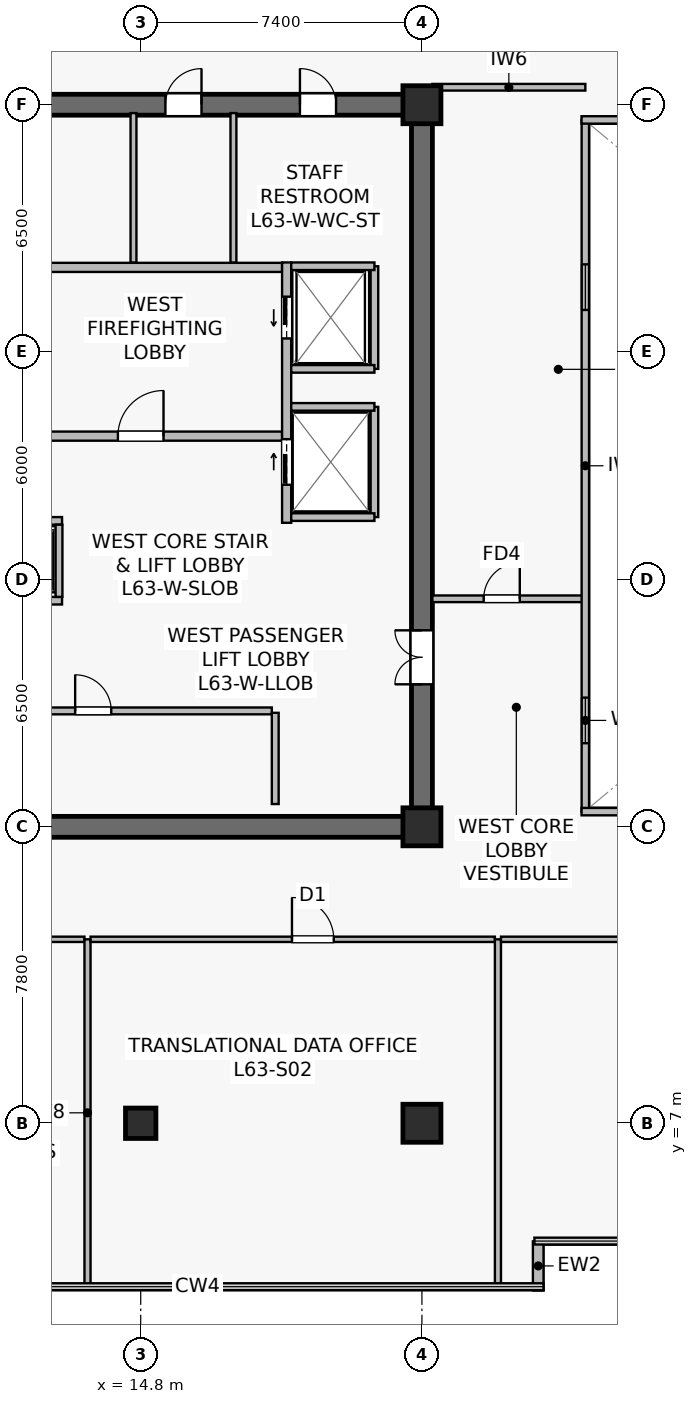
"""IFC4 building model, lengths in metres.
Left out: names, types, materials, properties, quantities, classifications, styles, units other than length and angle.
Written with IfcOpenShell. Run it as: python <this file> out.ifc"""

import sys

from ifc_helpers import new_model, si_unit, direction, frame, frame_2d, origin, origin_2d, place, context, subcontext, project, spatial, rectangle, extrude, source, transform, mapped, element, fill, save


model = new_model("IFC4")
c1 = context("Model", 3, precision=1e-05, world=origin(), true_north=direction((0.0, 1.0)))
c2 = subcontext(c1, "Body", "Model", "MODEL_VIEW")
j1 = project(units=[si_unit("LENGTHUNIT", "METRE"), si_unit("PLANEANGLEUNIT", "RADIAN")], contexts=[c1])
p1 = place(None, origin())
s1 = spatial("IfcSite", under=j1, at=p1, CompositionType="ELEMENT")
p2 = place(p1, origin())
s2 = spatial("IfcBuilding", under=s1, at=p2, CompositionType="ELEMENT")
p3 = place(p2, frame((0.0, 0.0, 262.9)))
s3 = spatial("IfcBuildingStorey", under=s2, at=p3, CompositionType="ELEMENT", Elevation=262.9)
p4 = place(p3, frame((7.125, 14.8, 0.0), z_axis=(0.0, 0.0, 1.0), x_axis=(1.0, 0.0, 0.0)))
e1 = element("IfcWall", 1, at=p4, inside=s3, PredefinedType="SHEAR", context=c2, shape_type="SweptSolid", body=[
    extrude(rectangle(XDim=15.35, YDim=0.55, at=frame_2d((7.675, 0.0))), origin(), (0.0, 0.0, 1.0), 3.8),
])
p5 = place(p3, frame((7.125, 33.8, 0.0), z_axis=(0.0, 0.0, 1.0), x_axis=(1.0, 0.0, 0.0)))
e2 = element("IfcWall", 2, at=p5, inside=s3, PredefinedType="SHEAR", context=c2, shape_type="SweptSolid", body=[
    extrude(rectangle(XDim=15.35, YDim=0.55, at=frame_2d((7.675, 0.0))), origin(), (0.0, 0.0, 1.0), 3.8),
])
p6 = place(p5, frame((8.325, 0.0, 0.0)))
e3 = element("IfcOpeningElement", 3, at=p6, cuts=e2, PredefinedType="OPENING", context=c2, shape_type="SweptSolid", body=[
    extrude(rectangle(XDim=0.95, YDim=2.15, at=frame_2d((0.475, 1.075))), frame((0.0, 0.285, 0.0), z_axis=(0.0, -1.0, 0.0), x_axis=(1.0, 0.0, 0.0)), (0.0, 0.0, 1.0), 0.57),
])
p7 = place(p5, frame((11.865, 0.0, 0.0)))
e4 = element("IfcOpeningElement", 4, at=p7, cuts=e2, PredefinedType="OPENING", context=c2, shape_type="SweptSolid", body=[
    extrude(rectangle(XDim=0.95, YDim=2.15, at=frame_2d((0.475, 1.075))), frame((0.0, 0.285, 0.0), z_axis=(0.0, -1.0, 0.0), x_axis=(1.0, 0.0, 0.0)), (0.0, 0.0, 1.0), 0.57),
])
p8 = place(p3, frame((22.2, 15.075, 0.0), z_axis=(0.0, 0.0, 1.0), x_axis=(0.0, 1.0, 0.0)))
e5 = element("IfcWall", 5, at=p8, inside=s3, PredefinedType="SHEAR", context=c2, shape_type="SweptSolid", body=[
    extrude(rectangle(XDim=18.45, YDim=0.55, at=frame_2d((9.225, 0.0))), origin(), (0.0, 0.0, 1.0), 3.8),
])
p9 = place(p8, frame((3.475, 0.0, 0.0)))
e6 = element("IfcOpeningElement", 6, at=p9, cuts=e5, PredefinedType="OPENING", context=c2, shape_type="SweptSolid", body=[
    extrude(rectangle(XDim=1.42, YDim=2.2, at=frame_2d((0.71, 1.1))), frame((0.0, 0.285, 0.0), z_axis=(0.0, -1.0, 0.0), x_axis=(1.0, 0.0, 0.0)), (0.0, 0.0, 1.0), 0.57),
])
m1 = source(origin(), c2, "Body", "SweptSolid", [
    extrude(rectangle(XDim=0.8, YDim=0.8, at=origin_2d()), origin(), (0.0, 0.0, 1.0), 4.1),
])
p10 = place(p3, frame((14.8, 7.0, 0.0), z_axis=(0.0, 0.0, 1.0), x_axis=(1.0, 0.0, 0.0)))
e7 = element("IfcColumn", 7, at=p10, inside=s3, PredefinedType="COLUMN", context=c2, shape_type="MappedRepresentation", body=[
    mapped(m1, transform((0.0, 0.0, 0.0), scale=1.0)),
])
m2 = source(origin(), c2, "Body", "SweptSolid", [
    extrude(rectangle(XDim=1.0, YDim=1.0, at=origin_2d()), origin(), (0.0, 0.0, 1.0), 4.1),
])
for number, where, z_axis, x_axis in (
    (8, (22.2, 7.0, 0.0), (0.0, 0.0, 1.0), (1.0, 0.0, 0.0)),
    (9, (22.2, 14.8, 0.0), (0.0, 0.0, 1.0), (1.0, 0.0, 0.0)),
    (10, (22.2, 33.8, 0.0), (0.0, 0.0, 1.0), (1.0, 0.0, 0.0)),
):
    element("IfcColumn", number, at=place(p3, frame(where, z_axis=z_axis, x_axis=x_axis)), inside=s3, PredefinedType="COLUMN", context=c2, shape_type="MappedRepresentation", body=[
        mapped(m2, transform((0.0, 0.0, 0.0), scale=1.0)),
    ])
p11 = place(p3, frame((25.26, 2.6, 0.0), z_axis=(0.0, 0.0, 1.0), x_axis=(0.0, 1.0, 0.0)))
e11 = element("IfcWall", 11, at=p11, inside=s3, PredefinedType="STANDARD", context=c2, shape_type="SweptSolid", body=[
    extrude(rectangle(XDim=1.293, YDim=0.28, at=frame_2d((0.646, 0.0))), origin(), (0.0, 0.0, 1.0), 3.8),
])
p12 = place(p3, frame((11.6, 25.08, 0.0), z_axis=(0.0, 0.0, 1.0), x_axis=(1.0, 0.0, 0.0)))
e12 = element("IfcWall", 12, at=p12, inside=s3, PredefinedType="SOLIDWALL", context=c2, shape_type="SweptSolid", body=[
    extrude(rectangle(XDim=6.92, YDim=0.24, at=frame_2d((3.46, 0.0))), origin(), (0.0, 0.0, 1.0), 3.197),
])
p13 = place(p12, frame((2.6, 0.0, 0.0)))
e13 = element("IfcOpeningElement", 13, at=p13, cuts=e12, PredefinedType="OPENING", context=c2, shape_type="SweptSolid", body=[
    extrude(rectangle(XDim=1.2, YDim=2.16, at=frame_2d((0.6, 1.08))), frame((0.0, 0.13, 0.0), z_axis=(0.0, -1.0, 0.0), x_axis=(1.0, 0.0, 0.0)), (0.0, 0.0, 1.0), 0.26),
])
p14 = place(p3, frame((11.6, 29.52, 0.0), z_axis=(0.0, 0.0, 1.0), x_axis=(1.0, 0.0, 0.0)))
e14 = element("IfcWall", 14, at=p14, inside=s3, PredefinedType="SOLIDWALL", context=c2, shape_type="SweptSolid", body=[
    extrude(rectangle(XDim=6.92, YDim=0.24, at=frame_2d((3.46, 0.0))), origin(), (0.0, 0.0, 1.0), 3.197),
])
p15 = place(p3, frame((18.64, 22.8, 0.0), z_axis=(0.0, 0.0, 1.0), x_axis=(0.0, 1.0, 0.0)))
e15 = element("IfcWall", 15, at=p15, inside=s3, PredefinedType="SOLIDWALL", context=c2, shape_type="SweptSolid", body=[
    extrude(rectangle(XDim=6.85, YDim=0.24, at=frame_2d((3.425, 0.0))), origin(), (0.0, 0.0, 1.0), 2.935),
])
p16 = place(p15, frame((4.85, 0.0, 0.0)))
e16 = element("IfcOpeningElement", 16, at=p16, cuts=e15, PredefinedType="OPENING", context=c2, shape_type="SweptSolid", body=[
    extrude(rectangle(XDim=1.1, YDim=2.22, at=frame_2d((0.55, 1.11))), frame((0.0, 0.13, 0.0), z_axis=(0.0, -1.0, 0.0), x_axis=(1.0, 0.0, 0.0)), (0.0, 0.0, 1.0), 0.26),
])
p17 = place(p15, frame((1.0, 0.0, 0.0)))
e17 = element("IfcOpeningElement", 17, at=p17, cuts=e15, PredefinedType="OPENING", context=c2, shape_type="SweptSolid", body=[
    extrude(rectangle(XDim=1.2, YDim=2.22, at=frame_2d((0.6, 1.11))), frame((0.0, 0.13, 0.0), z_axis=(0.0, -1.0, 0.0), x_axis=(1.0, 0.0, 0.0)), (0.0, 0.0, 1.0), 0.26),
])
p18 = place(p3, frame((10.47, 20.75, 0.0), z_axis=(0.0, 0.0, 1.0), x_axis=(1.0, 0.0, 0.0)))
e18 = element("IfcWall", 18, at=p18, inside=s3, PredefinedType="SOLIDWALL", context=c2, shape_type="SweptSolid", body=[
    extrude(rectangle(XDim=2.26, YDim=0.2, at=frame_2d((1.13, 0.0))), origin(), (0.0, 0.0, 1.0), 3.8),
])
p19 = place(p18, frame((0.58, 0.0, 0.0)))
e19 = element("IfcOpeningElement", 19, at=p19, cuts=e18, PredefinedType="OPENING", context=c2, shape_type="SweptSolid", body=[
    extrude(rectangle(XDim=1.1, YDim=2.22, at=frame_2d((0.55, 1.11))), frame((0.0, 0.11, 0.0), z_axis=(0.0, -1.0, 0.0), x_axis=(1.0, 0.0, 0.0)), (0.0, 0.0, 1.0), 0.22),
])
p20 = place(p3, frame((10.47, 22.85, 0.0), z_axis=(0.0, 0.0, 1.0), x_axis=(1.0, 0.0, 0.0)))
e20 = element("IfcWall", 20, at=p20, inside=s3, PredefinedType="SOLIDWALL", context=c2, shape_type="SweptSolid", body=[
    extrude(rectangle(XDim=2.26, YDim=0.2, at=frame_2d((1.13, 0.0))), origin(), (0.0, 0.0, 1.0), 3.8),
])
p21 = place(p3, frame((12.65, 20.85, 0.0), z_axis=(0.0, 0.0, 1.0), x_axis=(0.0, 1.0, 0.0)))
e21 = element("IfcWall", 21, at=p21, inside=s3, PredefinedType="SOLIDWALL", context=c2, shape_type="SweptSolid", body=[
    extrude(rectangle(XDim=1.9, YDim=0.18, at=frame_2d((0.95, 0.0))), origin(), (0.0, 0.0, 1.0), 3.8),
])
p22 = place(p3, frame((20.95, 26.85, 0.0), z_axis=(0.0, 0.0, 1.0), x_axis=(0.0, 1.0, 0.0)))
e22 = element("IfcWall", 22, at=p22, inside=s3, PredefinedType="SOLIDWALL", context=c2, shape_type="SweptSolid", body=[
    extrude(rectangle(XDim=2.7, YDim=0.2, at=frame_2d((1.35, 0.0))), origin(), (0.0, 0.0, 1.0), 3.8),
])
p23 = place(p3, frame((18.76, 29.55, 0.0), z_axis=(0.0, 0.0, 1.0), x_axis=(1.0, 0.0, 0.0)))
e23 = element("IfcWall", 23, at=p23, inside=s3, PredefinedType="SOLIDWALL", context=c2, shape_type="SweptSolid", body=[
    extrude(rectangle(XDim=2.19, YDim=0.2, at=frame_2d((1.095, 0.0))), origin(), (0.0, 0.0, 1.0), 3.8),
])
p24 = place(p3, frame((18.76, 26.85, 0.0), z_axis=(0.0, 0.0, 1.0), x_axis=(1.0, 0.0, 0.0)))
e24 = element("IfcWall", 24, at=p24, inside=s3, PredefinedType="SOLIDWALL", context=c2, shape_type="SweptSolid", body=[
    extrude(rectangle(XDim=2.19, YDim=0.2, at=frame_2d((1.095, 0.0))), origin(), (0.0, 0.0, 1.0), 3.197),
])
p25 = place(p3, frame((20.95, 22.95, 0.0), z_axis=(0.0, 0.0, 1.0), x_axis=(0.0, 1.0, 0.0)))
e25 = element("IfcWall", 25, at=p25, inside=s3, PredefinedType="SOLIDWALL", context=c2, shape_type="SweptSolid", body=[
    extrude(rectangle(XDim=2.9, YDim=0.2, at=frame_2d((1.45, 0.0))), origin(), (0.0, 0.0, 1.0), 2.935),
])
for number, where, z_axis, x_axis in (
    (26, (18.76, 25.85, 0.0), (0.0, 0.0, 1.0), (1.0, 0.0, 0.0)),
    (27, (18.76, 22.95, 0.0), (0.0, 0.0, 1.0), (1.0, 0.0, 0.0)),
):
    element("IfcWall", number, at=place(p3, frame(where, z_axis=z_axis, x_axis=x_axis)), inside=s3, PredefinedType="SOLIDWALL", context=c2, shape_type="SweptSolid", body=[
        extrude(rectangle(XDim=2.19, YDim=0.2, at=frame_2d((1.095, 0.0))), origin(), (0.0, 0.0, 1.0), 3.8),
    ])
p26 = place(p3, frame((8.85, 17.85, 0.0), z_axis=(0.0, 0.0, 1.0), x_axis=(1.0, 0.0, 0.0)))
e28 = element("IfcWall", 28, at=p26, inside=s3, PredefinedType="SOLIDWALL", context=c2, shape_type="SweptSolid", body=[
    extrude(rectangle(XDim=9.4, YDim=0.18, at=frame_2d((4.7, 0.0))), origin(), (0.0, 0.0, 1.0), 3.197),
])
p27 = place(p26, frame((4.225, 0.0, 0.0)))
e29 = element("IfcOpeningElement", 29, at=p27, cuts=e28, PredefinedType="OPENING", context=c2, shape_type="SweptSolid", body=[
    extrude(rectangle(XDim=0.95, YDim=2.15, at=frame_2d((0.475, 1.075))), frame((0.0, 0.1, 0.0), z_axis=(0.0, -1.0, 0.0), x_axis=(1.0, 0.0, 0.0)), (0.0, 0.0, 1.0), 0.2),
])
p28 = place(p3, frame((18.34, 15.4, 0.0), z_axis=(0.0, 0.0, 1.0), x_axis=(0.0, 1.0, 0.0)))
e30 = element("IfcWall", 30, at=p28, inside=s3, PredefinedType="SOLIDWALL", context=c2, shape_type="SweptSolid", body=[
    extrude(rectangle(XDim=2.4, YDim=0.18, at=frame_2d((1.2, 0.0))), origin(), (0.0, 0.0, 1.0), 3.8),
])
p29 = place(p3, frame((14.61, 29.65, 0.0), z_axis=(0.0, 0.0, 1.0), x_axis=(0.0, 1.0, 0.0)))
e31 = element("IfcWall", 31, at=p29, inside=s3, PredefinedType="PLUMBINGWALL", context=c2, shape_type="SweptSolid", body=[
    extrude(rectangle(XDim=3.93, YDim=0.155, at=frame_2d((1.965, 0.0))), origin(), (0.0, 0.0, 1.0), 3.197),
])
p30 = place(p3, frame((17.24, 29.65, 0.0), z_axis=(0.0, 0.0, 1.0), x_axis=(0.0, 1.0, 0.0)))
e32 = element("IfcWall", 32, at=p30, inside=s3, PredefinedType="PLUMBINGWALL", context=c2, shape_type="SweptSolid", body=[
    extrude(rectangle(XDim=3.93, YDim=0.155, at=frame_2d((1.965, 0.0))), origin(), (0.0, 0.0, 1.0), 3.8),
])
p31 = place(p3, frame((22.475, 34.26, 0.0), z_axis=(0.0, 0.0, 1.0), x_axis=(1.0, 0.0, 0.0)))
e33 = element("IfcWall", 33, at=p31, inside=s3, PredefinedType="PARTITIONING", context=c2, shape_type="SweptSolid", body=[
    extrude(rectangle(XDim=4.025, YDim=0.175, at=frame_2d((2.012, 0.0))), origin(), (0.0, 0.0, 1.0), 3.535),
])
p32 = place(p3, frame((22.475, 20.8, 0.0), z_axis=(0.0, 0.0, 1.0), x_axis=(1.0, 0.0, 0.0)))
e34 = element("IfcWall", 34, at=p32, inside=s3, PredefinedType="PARTITIONING", context=c2, shape_type="SweptSolid", body=[
    extrude(rectangle(XDim=4.025, YDim=0.175, at=frame_2d((2.012, 0.0))), origin(), (0.0, 0.0, 1.0), 3.8),
])
p33 = place(p32, frame((1.35, 0.0, 0.0)))
e35 = element("IfcOpeningElement", 35, at=p33, cuts=e34, PredefinedType="OPENING", context=c2, shape_type="SweptSolid", body=[
    extrude(rectangle(XDim=0.95, YDim=2.15, at=frame_2d((0.475, 1.075))), frame((0.0, 0.098, 0.0), z_axis=(0.0, -1.0, 0.0), x_axis=(1.0, 0.0, 0.0)), (0.0, 0.0, 1.0), 0.195),
])
p34 = place(p3, frame((26.5, 15.2, 0.0), z_axis=(0.0, 0.0, 1.0), x_axis=(0.0, 1.0, 0.0)))
e36 = element("IfcWall", 36, at=p34, inside=s3, PredefinedType="SOLIDWALL", context=c2, shape_type="SweptSolid", body=[
    extrude(rectangle(XDim=18.2, YDim=0.195, at=frame_2d((9.1, 0.0))), origin(), (0.0, 0.0, 1.0), 3.8),
])
p35 = place(p34, frame((1.8, 0.0, 0.9)))
e37 = element("IfcOpeningElement", 37, at=p35, cuts=e36, PredefinedType="OPENING", context=c2, shape_type="SweptSolid", body=[
    extrude(rectangle(XDim=1.2, YDim=1.35, at=frame_2d((0.6, 0.675))), frame((0.0, 0.107, 0.0), z_axis=(0.0, -1.0, 0.0), x_axis=(1.0, 0.0, 0.0)), (0.0, 0.0, 1.0), 0.215),
])
p36 = place(p34, frame((13.2, 0.0, 0.9)))
e38 = element("IfcOpeningElement", 38, at=p36, cuts=e36, PredefinedType="OPENING", context=c2, shape_type="SweptSolid", body=[
    extrude(rectangle(XDim=1.2, YDim=1.35, at=frame_2d((0.6, 0.675))), frame((0.0, 0.107, 0.0), z_axis=(0.0, -1.0, 0.0), x_axis=(1.0, 0.0, 0.0)), (0.0, 0.0, 1.0), 0.215),
])
for number, where, z_axis, x_axis in (
    (39, (26.4, 15.2, 0.0), (0.0, 0.0, 1.0), (1.0, 0.0, 0.0)),
    (40, (26.4, 33.4, 0.0), (0.0, 0.0, 1.0), (1.0, 0.0, 0.0)),
):
    element("IfcWall", number, at=place(p3, frame(where, z_axis=z_axis, x_axis=x_axis)), inside=s3, PredefinedType="SOLIDWALL", context=c2, shape_type="SweptSolid", body=[
        extrude(rectangle(XDim=22.0, YDim=0.195, at=frame_2d((11.0, 0.0))), origin(), (0.0, 0.0, 1.0), 3.8),
    ])
p37 = place(p3, frame((7.31, 11.84, 0.0), z_axis=(0.0, 0.0, 1.0), x_axis=(1.0, 0.0, 0.0)))
e41 = element("IfcWall", 41, at=p37, inside=s3, PredefinedType="PARTITIONING", context=c2, shape_type="SweptSolid", body=[
    extrude(rectangle(XDim=6.01, YDim=0.14, at=frame_2d((3.005, 0.0))), origin(), (0.0, 0.0, 1.0), 3.335),
])
p38 = place(p37, frame((2.246, 0.0, 0.0)))
e42 = element("IfcOpeningElement", 42, at=p38, cuts=e41, PredefinedType="OPENING", context=c2, shape_type="SweptSolid", body=[
    extrude(rectangle(XDim=1.0, YDim=2.15, at=frame_2d((0.5, 1.075))), frame((0.0, 0.08, 0.0), z_axis=(0.0, -1.0, 0.0), x_axis=(1.0, 0.0, 0.0)), (0.0, 0.0, 1.0), 0.16),
])
p39 = place(p3, frame((13.4, 2.71, 0.0), z_axis=(0.0, 0.0, 1.0), x_axis=(0.0, 1.0, 0.0)))
e43 = element("IfcWall", 43, at=p39, inside=s3, PredefinedType="PARTITIONING", context=c2, shape_type="SweptSolid", body=[
    extrude(rectangle(XDim=9.13, YDim=0.16, at=frame_2d((4.565, 0.0))), origin(), (0.0, 0.0, 1.0), 3.135),
])
p40 = place(p3, frame((13.48, 11.84, 0.0), z_axis=(0.0, 0.0, 1.0), x_axis=(1.0, 0.0, 0.0)))
e44 = element("IfcWall", 44, at=p40, inside=s3, PredefinedType="PARTITIONING", context=c2, shape_type="SweptSolid", body=[
    extrude(rectangle(XDim=10.64, YDim=0.14, at=frame_2d((5.32, 0.0))), origin(), (0.0, 0.0, 1.0), 3.197),
])
p41 = place(p40, frame((5.3, 0.0, 0.0)))
e45 = element("IfcOpeningElement", 45, at=p41, cuts=e44, PredefinedType="OPENING", context=c2, shape_type="SweptSolid", body=[
    extrude(rectangle(XDim=1.1, YDim=2.18, at=frame_2d((0.55, 1.09))), frame((0.0, 0.08, 0.0), z_axis=(0.0, -1.0, 0.0), x_axis=(1.0, 0.0, 0.0)), (0.0, 0.0, 1.0), 0.16),
])
p42 = place(p3, frame((24.2, 2.71, 0.0), z_axis=(0.0, 0.0, 1.0), x_axis=(0.0, 1.0, 0.0)))
e46 = element("IfcWall", 46, at=p42, inside=s3, PredefinedType="PARTITIONING", context=c2, shape_type="SweptSolid", body=[
    extrude(rectangle(XDim=9.13, YDim=0.16, at=frame_2d((4.565, 0.0))), origin(), (0.0, 0.0, 1.0), 3.135),
])
p43 = place(p3, frame((24.28, 11.84, 0.0), z_axis=(0.0, 0.0, 1.0), x_axis=(1.0, 0.0, 0.0)))
e47 = element("IfcWall", 47, at=p43, inside=s3, PredefinedType="PARTITIONING", context=c2, shape_type="SweptSolid", body=[
    extrude(rectangle(XDim=13.44, YDim=0.14, at=frame_2d((6.72, 0.0))), origin(), (0.0, 0.0, 1.0), 3.197),
])
p44 = place(p43, frame((5.472, 0.0, 0.0)))
e48 = element("IfcOpeningElement", 48, at=p44, cuts=e47, PredefinedType="OPENING", context=c2, shape_type="SweptSolid", body=[
    extrude(rectangle(XDim=1.1, YDim=2.18, at=frame_2d((0.55, 1.09))), frame((0.0, 0.08, 0.0), z_axis=(0.0, -1.0, 0.0), x_axis=(1.0, 0.0, 0.0)), (0.0, 0.0, 1.0), 0.16),
])
m3 = source(origin(), c2, "Body", "SweptSolid", [
    extrude(rectangle(XDim=1.2, YDim=1.35, at=frame_2d((0.6, 0.675))), frame((0.0, 0.03, 0.0), z_axis=(0.0, -1.0, 0.0), x_axis=(1.0, 0.0, 0.0)), (0.0, 0.0, 1.0), 0.06),
])
p45 = place(p35, origin())
e49 = element("IfcWindow", 49, at=p45, inside=s3, PartitioningType="SINGLE_PANEL", PredefinedType="WINDOW", context=c2, shape_type="MappedRepresentation", body=[
    mapped(m3, transform((0.0, 0.0, 0.0), scale=1.0)),
])
fill(e37, e49)
p46 = place(p36, origin())
e50 = element("IfcWindow", 50, at=p46, inside=s3, PartitioningType="SINGLE_PANEL", PredefinedType="WINDOW", context=c2, shape_type="MappedRepresentation", body=[
    mapped(m3, transform((0.0, 0.0, 0.0), scale=1.0)),
])
fill(e38, e50)
m4 = source(origin(), c2, "Body", "SweptSolid", [
    extrude(rectangle(XDim=1.2, YDim=2.16, at=frame_2d((0.6, 1.08))), frame((0.0, 0.025, 0.0), z_axis=(0.0, -1.0, 0.0), x_axis=(1.0, 0.0, 0.0)), (0.0, 0.0, 1.0), 0.05),
])
p47 = place(p13, origin())
e51 = element("IfcDoor", 51, at=p47, inside=s3, OperationType="SINGLE_SWING_RIGHT", PredefinedType="DOOR", context=c2, shape_type="MappedRepresentation", body=[
    mapped(m4, transform((0.0, 0.0, 0.0), scale=1.0)),
])
fill(e13, e51)
m5 = source(origin(), c2, "Body", "SweptSolid", [
    extrude(rectangle(XDim=1.1, YDim=2.22, at=frame_2d((0.55, 1.11))), frame((0.0, 0.025, 0.0), z_axis=(0.0, -1.0, 0.0), x_axis=(1.0, 0.0, 0.0)), (0.0, 0.0, 1.0), 0.05),
])
p48 = place(p16, origin())
e52 = element("IfcDoor", 52, at=p48, inside=s3, OperationType="SLIDING_TO_LEFT", PredefinedType="USERDEFINED", context=c2, shape_type="MappedRepresentation", body=[
    mapped(m5, transform((0.0, 0.0, 0.0), scale=1.0)),
])
fill(e16, e52)
m6 = source(origin(), c2, "Body", "SweptSolid", [
    extrude(rectangle(XDim=1.2, YDim=2.22, at=frame_2d((0.6, 1.11))), frame((0.0, 0.025, 0.0), z_axis=(0.0, -1.0, 0.0), x_axis=(1.0, 0.0, 0.0)), (0.0, 0.0, 1.0), 0.05),
])
p49 = place(p17, origin())
e53 = element("IfcDoor", 53, at=p49, inside=s3, OperationType="SLIDING_TO_RIGHT", PredefinedType="USERDEFINED", context=c2, shape_type="MappedRepresentation", body=[
    mapped(m6, transform((0.0, 0.0, 0.0), scale=1.0)),
])
fill(e17, e53)
m7 = source(origin(), c2, "Body", "SweptSolid", [
    extrude(rectangle(XDim=0.95, YDim=2.15, at=frame_2d((0.475, 1.075))), frame((0.0, 0.025, 0.0), z_axis=(0.0, -1.0, 0.0), x_axis=(1.0, 0.0, 0.0)), (0.0, 0.0, 1.0), 0.05),
])
p50 = place(p27, origin())
e54 = element("IfcDoor", 54, at=p50, inside=s3, OperationType="SINGLE_SWING_LEFT", PredefinedType="DOOR", context=c2, shape_type="MappedRepresentation", body=[
    mapped(m7, transform((0.0, 0.0, 0.0), scale=1.0)),
])
fill(e29, e54)
m8 = source(origin(), c2, "Body", "SweptSolid", [
    extrude(rectangle(XDim=1.42, YDim=2.2, at=frame_2d((0.71, 1.1))), frame((0.0, 0.025, 0.0), z_axis=(0.0, -1.0, 0.0), x_axis=(1.0, 0.0, 0.0)), (0.0, 0.0, 1.0), 0.05),
])
p51 = place(p9, origin())
e55 = element("IfcDoor", 55, at=p51, inside=s3, OperationType="DOUBLE_DOOR_SINGLE_SWING", PredefinedType="DOOR", context=c2, shape_type="MappedRepresentation", body=[
    mapped(m8, transform((0.0, 0.0, 0.0), scale=1.0)),
])
fill(e6, e55)
p52 = place(p6, origin())
e56 = element("IfcDoor", 56, at=p52, inside=s3, OperationType="SINGLE_SWING_RIGHT", PredefinedType="DOOR", context=c2, shape_type="MappedRepresentation", body=[
    mapped(m7, transform((0.0, 0.0, 0.0), scale=1.0)),
])
fill(e3, e56)
p53 = place(p7, origin())
e57 = element("IfcDoor", 57, at=p53, inside=s3, OperationType="SINGLE_SWING_LEFT", PredefinedType="DOOR", context=c2, shape_type="MappedRepresentation", body=[
    mapped(m7, transform((0.0, 0.0, 0.0), scale=1.0)),
])
fill(e4, e57)
p54 = place(p33, origin())
e58 = element("IfcDoor", 58, at=p54, inside=s3, OperationType="SINGLE_SWING_RIGHT", PredefinedType="DOOR", context=c2, shape_type="MappedRepresentation", body=[
    mapped(m7, transform((0.0, 0.0, 0.0), scale=1.0)),
])
fill(e35, e58)
m9 = source(origin(), c2, "Body", "SweptSolid", [
    extrude(rectangle(XDim=1.1, YDim=2.18, at=frame_2d((0.55, 1.09))), frame((0.0, 0.025, 0.0), z_axis=(0.0, -1.0, 0.0), x_axis=(1.0, 0.0, 0.0)), (0.0, 0.0, 1.0), 0.05),
])
p55 = place(p41, origin())
e59 = element("IfcDoor", 59, at=p55, inside=s3, OperationType="SINGLE_SWING_LEFT", PredefinedType="DOOR", context=c2, shape_type="MappedRepresentation", body=[
    mapped(m9, transform((0.0, 0.0, 0.0), scale=1.0)),
])
fill(e45, e59)
save(model, sys.argv[1])
